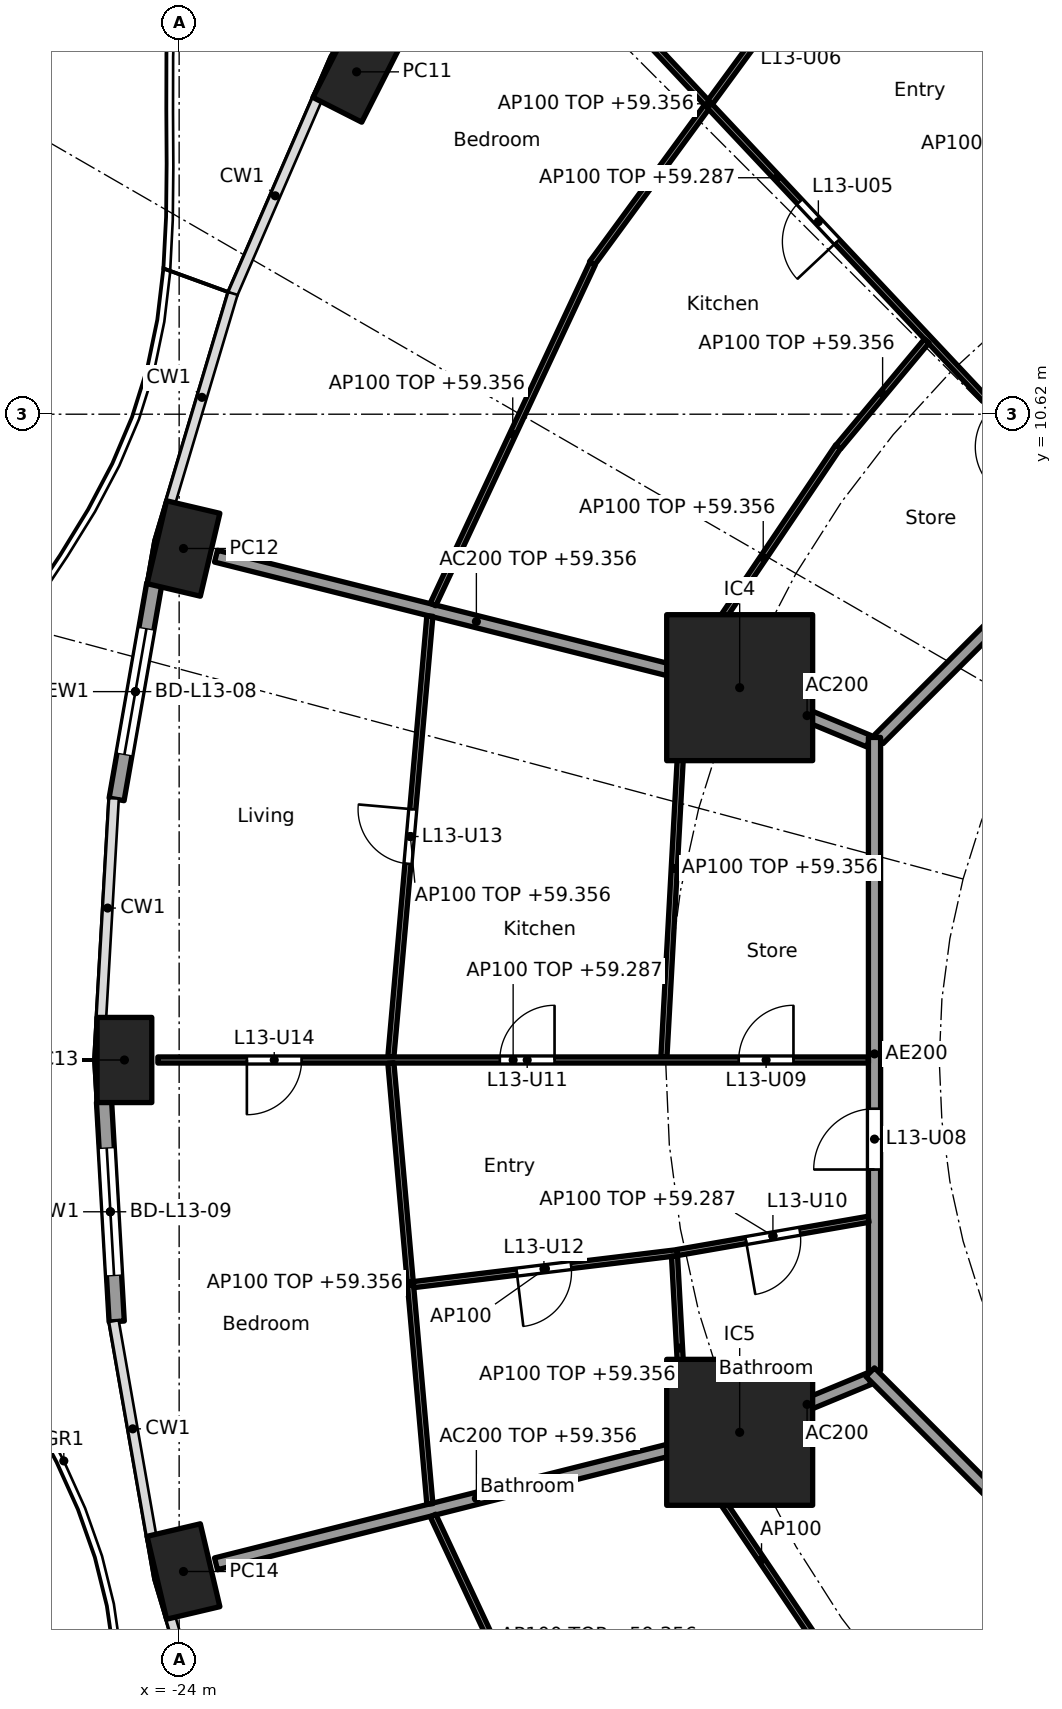
"""IFC4 building model, lengths in metres.
Left out: names, types, materials, properties, quantities, classifications, styles, units other than length and angle.
Written with IfcOpenShell. Run it as: python <this file> out.ifc"""

import sys

from ifc_helpers import new_model, si_unit, direction, frame, frame_2d, origin, origin_2d, place, context, subcontext, project, spatial, rectangle, hollow_rectangle, extrude, element, fill, save


model = new_model("IFC4")
c1 = context("Model", 3, precision=1e-05, world=origin(), true_north=direction((0.0, 1.0)))
c2 = subcontext(c1, "Body", "Model", "MODEL_VIEW")
j1 = project(units=[si_unit("LENGTHUNIT", "METRE"), si_unit("PLANEANGLEUNIT", "RADIAN")], contexts=[c1])
p1 = place(None, origin())
s1 = spatial("IfcSite", under=j1, at=p1, CompositionType="ELEMENT")
p2 = place(p1, origin())
s2 = spatial("IfcBuilding", under=s1, at=p2, CompositionType="ELEMENT")
p3 = place(p2, frame((0.0, 0.0, 56.6)))
s3 = spatial("IfcBuildingStorey", under=s2, at=p3, CompositionType="ELEMENT", Elevation=56.6)
for number, where, z_axis, x_axis in (
    (1, (-21.082, 16.25, 0.0), (0.0, 0.0, 1.0), (-0.452, -0.892, 0.0)),
    (2, (-23.929, 8.412, 0.0), (0.0, 0.0, 1.0), (-0.229, -0.973, 0.0)),
    (3, (-24.9, 0.0, 0.0), (0.0, 0.0, 1.0), (0.0, -1.0, 0.0)),
    (4, (-23.929, -8.412, 0.0), (0.0, 0.0, 1.0), (0.229, -0.973, 0.0)),
):
    element("IfcColumn", number, at=place(p3, frame(where, z_axis=z_axis, x_axis=x_axis)), inside=s3, PredefinedType="COLUMN", context=c2, shape_type="SweptSolid", body=[
        extrude(hollow_rectangle(XDim=1.4, YDim=0.9, WallThickness=0.05, at=origin_2d()), origin(), (0.0, 0.0, 1.0), 3.7),
    ])
for number, where, z_axis, x_axis in (
    (5, (-14.782, 6.123, 0.0), (0.0, 0.0, 1.0), (1.0, 0.0, 0.0)),
    (6, (-14.782, -6.123, 0.0), (0.0, 0.0, 1.0), (1.0, 0.0, 0.0)),
):
    element("IfcColumn", number, at=place(p3, frame(where, z_axis=z_axis, x_axis=x_axis)), inside=s3, PredefinedType="COLUMN", context=c2, shape_type="SweptSolid", body=[
        extrude(rectangle(XDim=2.4, YDim=2.4, at=origin_2d()), origin(), (0.0, 0.0, 1.0), 3.7),
    ])
p4 = place(p3, frame((-25.029, 4.286, 0.0), z_axis=(0.0, 0.0, 1.0), x_axis=(0.172217377323, 0.98505897029, 0.0)))
e7 = element("IfcWall", 7, at=p4, inside=s3, PredefinedType="SOLIDWALL", context=c2, shape_type="SweptSolid", body=[
    extrude(rectangle(XDim=3.598, YDim=0.25, at=frame_2d((1.799, 0.0))), origin(), (0.0, 0.0, 1.0), 3.44),
])
p5 = place(p4, frame((0.749, 0.0, 0.0)))
e8 = element("IfcOpeningElement", 8, at=p5, cuts=e7, PredefinedType="OPENING", context=c2, shape_type="SweptSolid", body=[
    extrude(rectangle(XDim=2.1, YDim=2.4, at=frame_2d((1.05, 1.2))), frame((0.0, 0.135, 0.0), z_axis=(0.0, -1.0, 0.0), x_axis=(1.0, 0.0, 0.0)), (0.0, 0.0, 1.0), 0.27),
])
p6 = place(p3, frame((-25.027, -4.3, 0.0), z_axis=(0.0, 0.0, 1.0), x_axis=(-0.057478727308, 0.998346731305, 0.0)))
e9 = element("IfcWall", 9, at=p6, inside=s3, PredefinedType="SOLIDWALL", context=c2, shape_type="SweptSolid", body=[
    extrude(rectangle(XDim=3.615, YDim=0.25, at=frame_2d((1.807, 0.0))), origin(), (0.0, 0.0, 1.0), 3.44),
])
p7 = place(p6, frame((0.757, 0.0, 0.0)))
e10 = element("IfcOpeningElement", 10, at=p7, cuts=e9, PredefinedType="OPENING", context=c2, shape_type="SweptSolid", body=[
    extrude(rectangle(XDim=2.1, YDim=2.4, at=frame_2d((1.05, 1.2))), frame((0.0, 0.135, 0.0), z_axis=(0.0, -1.0, 0.0), x_axis=(1.0, 0.0, 0.0)), (0.0, 0.0, 1.0), 0.27),
])
p8 = place(p3, frame((-12.657, 5.243, 0.0), z_axis=(0.0, 0.0, 1.0), x_axis=(-0.923885664896, 0.382668627144, 0.0)))
e11 = element("IfcWall", 11, at=p8, inside=s3, PredefinedType="PARTITIONING", context=c2, shape_type="SweptSolid", body=[
    extrude(rectangle(XDim=2.2, YDim=0.2, at=frame_2d((1.1, 0.0))), origin(), (0.0, 0.0, 1.0), 3.44),
])
p9 = place(p3, frame((-14.831, 6.135, 0.0), z_axis=(0.0, 0.0, 1.0), x_axis=(-0.969884949569, 0.243563512454, 0.0)))
e12 = element("IfcWall", 12, at=p9, inside=s3, PredefinedType="PARTITIONING", context=c2, shape_type="SweptSolid", body=[
    extrude(rectangle(XDim=8.829, YDim=0.2, at=frame_2d((4.415, 0.0))), origin(), (0.0, 0.0, 1.0), 2.756),
])
p10 = place(p3, frame((-12.657, -5.243, 0.0), z_axis=(0.0, 0.0, 1.0), x_axis=(-0.923885664896, -0.382668627144, 0.0)))
e13 = element("IfcWall", 13, at=p10, inside=s3, PredefinedType="PARTITIONING", context=c2, shape_type="SweptSolid", body=[
    extrude(rectangle(XDim=2.2, YDim=0.2, at=frame_2d((1.1, 0.0))), origin(), (0.0, 0.0, 1.0), 3.44),
])
p11 = place(p3, frame((-14.831, -6.135, 0.0), z_axis=(0.0, 0.0, 1.0), x_axis=(-0.969884949569, -0.243563512454, 0.0)))
e14 = element("IfcWall", 14, at=p11, inside=s3, PredefinedType="PARTITIONING", context=c2, shape_type="SweptSolid", body=[
    extrude(rectangle(XDim=8.829, YDim=0.2, at=frame_2d((4.415, 0.0))), origin(), (0.0, 0.0, 1.0), 2.756),
])
p12 = place(p3, frame((-5.275, 12.494, 0.0), z_axis=(0.0, 0.0, 1.0), x_axis=(-0.707106781187, -0.707106781187, 0.0)))
e15 = element("IfcWall", 15, at=p12, inside=s3, PredefinedType="PARTITIONING", context=c2, shape_type="SweptSolid", body=[
    extrude(rectangle(XDim=10.209, YDim=0.2, at=frame_2d((5.104, 0.0))), origin(), (0.0, 0.0, 1.0), 3.44),
])
p13 = place(p12, frame((2.87, 0.0, 0.0)))
e16 = element("IfcOpeningElement", 16, at=p13, cuts=e15, PredefinedType="OPENING", context=c2, shape_type="SweptSolid", body=[
    extrude(rectangle(XDim=1.0, YDim=2.1, at=frame_2d((0.5, 1.05))), frame((0.0, 0.11, 0.0), z_axis=(0.0, -1.0, 0.0), x_axis=(1.0, 0.0, 0.0)), (0.0, 0.0, 1.0), 0.22),
])
p14 = place(p3, frame((-12.565, 5.304, 0.0), z_axis=(0.0, 0.0, 1.0), x_axis=(0.0, -1.0, 0.0)))
e17 = element("IfcWall", 17, at=p14, inside=s3, PredefinedType="PARTITIONING", context=c2, shape_type="SweptSolid", body=[
    extrude(rectangle(XDim=10.409, YDim=0.2, at=frame_2d((5.205, 0.0))), origin(), (0.0, 0.0, 1.0), 3.44),
])
p15 = place(p14, frame((6.106, 0.0, 0.0)))
e18 = element("IfcOpeningElement", 18, at=p15, cuts=e17, PredefinedType="OPENING", context=c2, shape_type="SweptSolid", body=[
    extrude(rectangle(XDim=1.0, YDim=2.1, at=frame_2d((0.5, 1.05))), frame((0.0, 0.11, 0.0), z_axis=(0.0, -1.0, 0.0), x_axis=(1.0, 0.0, 0.0)), (0.0, 0.0, 1.0), 0.22),
])
p16 = place(p3, frame((-12.635, -5.134, 0.0), z_axis=(0.0, 0.0, 1.0), x_axis=(0.707106781187, -0.707106781187, 0.0)))
e19 = element("IfcWall", 19, at=p16, inside=s3, PredefinedType="PARTITIONING", context=c2, shape_type="SweptSolid", body=[
    extrude(rectangle(XDim=10.609, YDim=0.2, at=frame_2d((5.305, 0.0))), origin(), (0.0, 0.0, 1.0), 3.44),
])
p17 = place(p3, frame((-6.477, 11.427, 0.0), z_axis=(0.0, 0.0, 1.0), x_axis=(-0.457464037982, 0.889228122561, 0.0)))
e20 = element("IfcWall", 20, at=p17, inside=s3, PredefinedType="PARTITIONING", context=c2, shape_type="SweptSolid", body=[
    extrude(rectangle(XDim=10.032, YDim=0.1, at=frame_2d((5.016, 0.0))), origin(), (0.0, 0.0, 1.0), 2.687),
])
p18 = place(p17, frame((0.35, 0.0, 0.0)))
e21 = element("IfcOpeningElement", 21, at=p18, cuts=e20, PredefinedType="OPENING", context=c2, shape_type="SweptSolid", body=[
    extrude(rectangle(XDim=0.9, YDim=2.1, at=frame_2d((0.45, 1.05))), frame((0.0, 0.06, 0.0), z_axis=(0.0, -1.0, 0.0), x_axis=(1.0, 0.0, 0.0)), (0.0, 0.0, 1.0), 0.12),
])
p19 = place(p17, frame((6.735, 0.0, 0.0)))
e22 = element("IfcOpeningElement", 22, at=p19, cuts=e20, PredefinedType="OPENING", context=c2, shape_type="SweptSolid", body=[
    extrude(rectangle(XDim=0.9, YDim=2.1, at=frame_2d((0.45, 1.05))), frame((0.0, 0.06, 0.0), z_axis=(0.0, -1.0, 0.0), x_axis=(1.0, 0.0, 0.0)), (0.0, 0.0, 1.0), 0.12),
])
p20 = place(p3, frame((-13.362, 18.35, 0.0), z_axis=(0.0, 0.0, 1.0), x_axis=(-0.591191311491, -0.806531359104, 0.0)))
e23 = element("IfcWall", 23, at=p20, inside=s3, PredefinedType="PARTITIONING", context=c2, shape_type="SweptSolid", body=[
    extrude(rectangle(XDim=6.51, YDim=0.1, at=frame_2d((3.255, 0.0))), origin(), (0.0, 0.0, 1.0), 2.756),
])
p21 = place(p20, frame((1.202, 0.0, 0.0)))
e24 = element("IfcOpeningElement", 24, at=p21, cuts=e23, PredefinedType="OPENING", context=c2, shape_type="SweptSolid", body=[
    extrude(rectangle(XDim=0.9, YDim=2.1, at=frame_2d((0.45, 1.05))), frame((0.0, 0.06, 0.0), z_axis=(0.0, -1.0, 0.0), x_axis=(1.0, 0.0, 0.0)), (0.0, 0.0, 1.0), 0.12),
])
p22 = place(p3, frame((-8.953, 8.958, 0.0), z_axis=(0.0, 0.0, 1.0), x_axis=(-0.684574307023, 0.728943082939, 0.0)))
e25 = element("IfcWall", 25, at=p22, inside=s3, PredefinedType="PARTITIONING", context=c2, shape_type="SweptSolid", body=[
    extrude(rectangle(XDim=15.231, YDim=0.1, at=frame_2d((7.615, 0.0))), origin(), (0.0, 0.0, 1.0), 2.687),
])
p23 = place(p22, frame((1.54, 0.0, 0.0)))
e26 = element("IfcOpeningElement", 26, at=p23, cuts=e25, PredefinedType="OPENING", context=c2, shape_type="SweptSolid", body=[
    extrude(rectangle(XDim=0.9, YDim=2.1, at=frame_2d((0.45, 1.05))), frame((0.0, 0.06, 0.0), z_axis=(0.0, -1.0, 0.0), x_axis=(1.0, 0.0, 0.0)), (0.0, 0.0, 1.0), 0.12),
])
p24 = place(p22, frame((6.174, 0.0, 0.0)))
e27 = element("IfcOpeningElement", 27, at=p24, cuts=e25, PredefinedType="OPENING", context=c2, shape_type="SweptSolid", body=[
    extrude(rectangle(XDim=0.9, YDim=2.1, at=frame_2d((0.45, 1.05))), frame((0.0, 0.06, 0.0), z_axis=(0.0, -1.0, 0.0), x_axis=(1.0, 0.0, 0.0)), (0.0, 0.0, 1.0), 0.12),
])
p25 = place(p22, frame((11.8, 0.0, 0.0)))
e28 = element("IfcOpeningElement", 28, at=p25, cuts=e25, PredefinedType="OPENING", context=c2, shape_type="SweptSolid", body=[
    extrude(rectangle(XDim=0.9, YDim=2.1, at=frame_2d((0.45, 1.05))), frame((0.0, 0.06, 0.0), z_axis=(0.0, -1.0, 0.0), x_axis=(1.0, 0.0, 0.0)), (0.0, 0.0, 1.0), 0.12),
])
p26 = place(p3, frame((-11.705, 11.825, 0.0), z_axis=(0.0, 0.0, 1.0), x_axis=(-0.640861724905, -0.767656335577, 0.0)))
e29 = element("IfcWall", 29, at=p26, inside=s3, PredefinedType="PARTITIONING", context=c2, shape_type="SweptSolid", body=[
    extrude(rectangle(XDim=2.268, YDim=0.1, at=frame_2d((1.134, 0.0))), origin(), (0.0, 0.0, 1.0), 2.756),
])
p27 = place(p3, frame((-13.162, 10.087, 0.0), z_axis=(0.0, 0.0, 1.0), x_axis=(-0.55912750241, -0.829081682375, 0.0)))
e30 = element("IfcWall", 30, at=p27, inside=s3, PredefinedType="PARTITIONING", context=c2, shape_type="SweptSolid", body=[
    extrude(rectangle(XDim=4.408, YDim=0.1, at=frame_2d((2.204, 0.0))), origin(), (0.0, 0.0, 1.0), 2.756),
])
p28 = place(p3, frame((-17.203, 13.095, 0.0), z_axis=(0.0, 0.0, 1.0), x_axis=(-0.423926333401, -0.905696673202, 0.0)))
e31 = element("IfcWall", 31, at=p28, inside=s3, PredefinedType="PARTITIONING", context=c2, shape_type="SweptSolid", body=[
    extrude(rectangle(XDim=6.188, YDim=0.1, at=frame_2d((3.094, 0.0))), origin(), (0.0, 0.0, 1.0), 2.756),
])
p29 = place(p3, frame((-15.688, 6.249, 0.0), z_axis=(0.0, 0.0, 1.0), x_axis=(-0.054659814056, -0.998505034903, 0.0)))
e32 = element("IfcWall", 32, at=p29, inside=s3, PredefinedType="PARTITIONING", context=c2, shape_type="SweptSolid", body=[
    extrude(rectangle(XDim=6.208, YDim=0.1, at=frame_2d((3.104, 0.0))), origin(), (0.0, 0.0, 1.0), 2.756),
])
p30 = place(p3, frame((-19.877, 7.301, 0.0), z_axis=(0.0, 0.0, 1.0), x_axis=(-0.088143415068, -0.996107794558, 0.0)))
e33 = element("IfcWall", 33, at=p30, inside=s3, PredefinedType="PARTITIONING", context=c2, shape_type="SweptSolid", body=[
    extrude(rectangle(XDim=7.279, YDim=0.1, at=frame_2d((3.64, 0.0))), origin(), (0.0, 0.0, 1.0), 2.756),
])
p31 = place(p30, frame((3.189, 0.0, 0.0)))
e34 = element("IfcOpeningElement", 34, at=p31, cuts=e33, PredefinedType="OPENING", context=c2, shape_type="SweptSolid", body=[
    extrude(rectangle(XDim=0.9, YDim=2.1, at=frame_2d((0.45, 1.05))), frame((0.0, 0.06, 0.0), z_axis=(0.0, -1.0, 0.0), x_axis=(1.0, 0.0, 0.0)), (0.0, 0.0, 1.0), 0.12),
])
p32 = place(p3, frame((-12.665, 0.0, 0.0), z_axis=(0.0, 0.0, 1.0), x_axis=(-1.0, 0.0, 0.0)))
e35 = element("IfcWall", 35, at=p32, inside=s3, PredefinedType="PARTITIONING", context=c2, shape_type="SweptSolid", body=[
    extrude(rectangle(XDim=11.685, YDim=0.1, at=frame_2d((5.843, 0.0))), origin(), (0.0, 0.0, 1.0), 2.687),
])
p33 = place(p32, frame((1.233, 0.0, 0.0)))
e36 = element("IfcOpeningElement", 36, at=p33, cuts=e35, PredefinedType="OPENING", context=c2, shape_type="SweptSolid", body=[
    extrude(rectangle(XDim=0.9, YDim=2.1, at=frame_2d((0.45, 1.05))), frame((0.0, 0.06, 0.0), z_axis=(0.0, -1.0, 0.0), x_axis=(1.0, 0.0, 0.0)), (0.0, 0.0, 1.0), 0.12),
])
p34 = place(p32, frame((5.162, 0.0, 0.0)))
e37 = element("IfcOpeningElement", 37, at=p34, cuts=e35, PredefinedType="OPENING", context=c2, shape_type="SweptSolid", body=[
    extrude(rectangle(XDim=0.9, YDim=2.1, at=frame_2d((0.45, 1.05))), frame((0.0, 0.06, 0.0), z_axis=(0.0, -1.0, 0.0), x_axis=(1.0, 0.0, 0.0)), (0.0, 0.0, 1.0), 0.12),
])
p35 = place(p32, frame((9.322, 0.0, 0.0)))
e38 = element("IfcOpeningElement", 38, at=p35, cuts=e35, PredefinedType="OPENING", context=c2, shape_type="SweptSolid", body=[
    extrude(rectangle(XDim=0.9, YDim=2.1, at=frame_2d((0.45, 1.05))), frame((0.0, 0.06, 0.0), z_axis=(0.0, -1.0, 0.0), x_axis=(1.0, 0.0, 0.0)), (0.0, 0.0, 1.0), 0.12),
])
p36 = place(p3, frame((-20.518, -0.05, 0.0), z_axis=(0.0, 0.0, 1.0), x_axis=(0.088143415068, -0.996107794558, 0.0)))
e39 = element("IfcWall", 39, at=p36, inside=s3, PredefinedType="PARTITIONING", context=c2, shape_type="SweptSolid", body=[
    extrude(rectangle(XDim=7.279, YDim=0.1, at=frame_2d((3.64, 0.0))), origin(), (0.0, 0.0, 1.0), 2.756),
])
p37 = place(p3, frame((-12.663, -2.619, 0.0), z_axis=(0.0, 0.0, 1.0), x_axis=(-0.985220176102, -0.171292745325, 0.0)))
e40 = element("IfcWall", 40, at=p37, inside=s3, PredefinedType="PARTITIONING", context=c2, shape_type="SweptSolid", body=[
    extrude(rectangle(XDim=3.191, YDim=0.1, at=frame_2d((1.596, 0.0))), origin(), (0.0, 0.0, 1.0), 2.687),
])
p38 = place(p37, frame((1.146, 0.0, 0.0)))
e41 = element("IfcOpeningElement", 41, at=p38, cuts=e40, PredefinedType="OPENING", context=c2, shape_type="SweptSolid", body=[
    extrude(rectangle(XDim=0.9, YDim=2.1, at=frame_2d((0.45, 1.05))), frame((0.0, 0.06, 0.0), z_axis=(0.0, -1.0, 0.0), x_axis=(1.0, 0.0, 0.0)), (0.0, 0.0, 1.0), 0.12),
])
p39 = place(p3, frame((-15.807, -3.168, 0.0), z_axis=(0.0, 0.0, 1.0), x_axis=(-0.992741666002, -0.120266306938, 0.0)))
e42 = element("IfcWall", 42, at=p39, inside=s3, PredefinedType="PARTITIONING", context=c2, shape_type="SweptSolid", body=[
    extrude(rectangle(XDim=4.371, YDim=0.1, at=frame_2d((2.185, 0.0))), origin(), (0.0, 0.0, 1.0), 3.44),
])
p40 = place(p39, frame((1.76, 0.0, 0.0)))
e43 = element("IfcOpeningElement", 43, at=p40, cuts=e42, PredefinedType="OPENING", context=c2, shape_type="SweptSolid", body=[
    extrude(rectangle(XDim=0.9, YDim=2.1, at=frame_2d((0.45, 1.05))), frame((0.0, 0.06, 0.0), z_axis=(0.0, -1.0, 0.0), x_axis=(1.0, 0.0, 0.0)), (0.0, 0.0, 1.0), 0.12),
])
p41 = place(p3, frame((-15.854, -3.225, 0.0), z_axis=(0.0, 0.0, 1.0), x_axis=(0.054644199943, -0.998505889523, 0.0)))
e44 = element("IfcWall", 44, at=p41, inside=s3, PredefinedType="PARTITIONING", context=c2, shape_type="SweptSolid", body=[
    extrude(rectangle(XDim=3.029, YDim=0.1, at=frame_2d((1.515, 0.0))), origin(), (0.0, 0.0, 1.0), 2.756),
])
p42 = place(p3, frame((-15.627, -6.432, 0.0), z_axis=(0.0, 0.0, 1.0), x_axis=(0.559112679527, -0.829091678641, 0.0)))
e45 = element("IfcWall", 45, at=p42, inside=s3, PredefinedType="PARTITIONING", context=c2, shape_type="SweptSolid", body=[
    extrude(rectangle(XDim=4.308, YDim=0.1, at=frame_2d((2.154, 0.0))), origin(), (0.0, 0.0, 1.0), 3.44),
])
p43 = place(p3, frame((-19.826, -7.491, 0.0), z_axis=(0.0, 0.0, 1.0), x_axis=(0.423926333401, -0.905696673202, 0.0)))
e46 = element("IfcWall", 46, at=p43, inside=s3, PredefinedType="PARTITIONING", context=c2, shape_type="SweptSolid", body=[
    extrude(rectangle(XDim=6.188, YDim=0.1, at=frame_2d((3.094, 0.0))), origin(), (0.0, 0.0, 1.0), 2.756),
])
p44 = place(p5, origin())
e47 = element("IfcDoor", 47, at=p44, inside=s3, OperationType="SLIDING_TO_LEFT", PredefinedType="DOOR", context=c2, shape_type="SweptSolid", body=[
    extrude(rectangle(XDim=2.1, YDim=2.4, at=frame_2d((1.05, 1.2))), frame((0.0, 0.025, 0.0), z_axis=(0.0, -1.0, 0.0), x_axis=(1.0, 0.0, 0.0)), (0.0, 0.0, 1.0), 0.05),
])
fill(e8, e47)
p45 = place(p7, origin())
e48 = element("IfcDoor", 48, at=p45, inside=s3, OperationType="SLIDING_TO_LEFT", PredefinedType="DOOR", context=c2, shape_type="SweptSolid", body=[
    extrude(rectangle(XDim=2.1, YDim=2.4, at=frame_2d((1.05, 1.2))), frame((0.0, 0.025, 0.0), z_axis=(0.0, -1.0, 0.0), x_axis=(1.0, 0.0, 0.0)), (0.0, 0.0, 1.0), 0.05),
])
fill(e10, e48)
p46 = place(p24, origin())
e49 = element("IfcDoor", 49, at=p46, inside=s3, OperationType="SINGLE_SWING_LEFT", PredefinedType="DOOR", context=c2, shape_type="SweptSolid", body=[
    extrude(rectangle(XDim=0.9, YDim=2.1, at=frame_2d((0.45, 1.05))), frame((0.0, 0.025, 0.0), z_axis=(0.0, -1.0, 0.0), x_axis=(1.0, 0.0, 0.0)), (0.0, 0.0, 1.0), 0.05),
])
fill(e27, e49)
p47 = place(p15, frame((1.0, 0.0, 0.0), x_axis=(-1.0, 0.0, 0.0)))
e50 = element("IfcDoor", 50, at=p47, inside=s3, OperationType="SINGLE_SWING_LEFT", PredefinedType="DOOR", context=c2, shape_type="SweptSolid", body=[
    extrude(rectangle(XDim=1.0, YDim=2.1, at=frame_2d((0.5, 1.05))), frame((0.0, 0.025, 0.0), z_axis=(0.0, -1.0, 0.0), x_axis=(1.0, 0.0, 0.0)), (0.0, 0.0, 1.0), 0.05),
])
fill(e18, e50)
p48 = place(p33, frame((0.9, 0.0, 0.0), x_axis=(-1.0, 0.0, 0.0)))
e51 = element("IfcDoor", 51, at=p48, inside=s3, OperationType="SINGLE_SWING_RIGHT", PredefinedType="DOOR", context=c2, shape_type="SweptSolid", body=[
    extrude(rectangle(XDim=0.9, YDim=2.1, at=frame_2d((0.45, 1.05))), frame((0.0, 0.025, 0.0), z_axis=(0.0, -1.0, 0.0), x_axis=(1.0, 0.0, 0.0)), (0.0, 0.0, 1.0), 0.05),
])
fill(e36, e51)
p49 = place(p38, origin())
e52 = element("IfcDoor", 52, at=p49, inside=s3, OperationType="SINGLE_SWING_RIGHT", PredefinedType="DOOR", context=c2, shape_type="SweptSolid", body=[
    extrude(rectangle(XDim=0.9, YDim=2.1, at=frame_2d((0.45, 1.05))), frame((0.0, 0.025, 0.0), z_axis=(0.0, -1.0, 0.0), x_axis=(1.0, 0.0, 0.0)), (0.0, 0.0, 1.0), 0.05),
])
fill(e41, e52)
p50 = place(p34, frame((0.9, 0.0, 0.0), x_axis=(-1.0, 0.0, 0.0)))
e53 = element("IfcDoor", 53, at=p50, inside=s3, OperationType="SINGLE_SWING_RIGHT", PredefinedType="DOOR", context=c2, shape_type="SweptSolid", body=[
    extrude(rectangle(XDim=0.9, YDim=2.1, at=frame_2d((0.45, 1.05))), frame((0.0, 0.025, 0.0), z_axis=(0.0, -1.0, 0.0), x_axis=(1.0, 0.0, 0.0)), (0.0, 0.0, 1.0), 0.05),
])
fill(e37, e53)
p51 = place(p40, origin())
e54 = element("IfcDoor", 54, at=p51, inside=s3, OperationType="SINGLE_SWING_RIGHT", PredefinedType="DOOR", context=c2, shape_type="SweptSolid", body=[
    extrude(rectangle(XDim=0.9, YDim=2.1, at=frame_2d((0.45, 1.05))), frame((0.0, 0.025, 0.0), z_axis=(0.0, -1.0, 0.0), x_axis=(1.0, 0.0, 0.0)), (0.0, 0.0, 1.0), 0.05),
])
fill(e43, e54)
p52 = place(p31, frame((0.9, 0.0, 0.0), x_axis=(-1.0, 0.0, 0.0)))
e55 = element("IfcDoor", 55, at=p52, inside=s3, OperationType="SINGLE_SWING_RIGHT", PredefinedType="DOOR", context=c2, shape_type="SweptSolid", body=[
    extrude(rectangle(XDim=0.9, YDim=2.1, at=frame_2d((0.45, 1.05))), frame((0.0, 0.025, 0.0), z_axis=(0.0, -1.0, 0.0), x_axis=(1.0, 0.0, 0.0)), (0.0, 0.0, 1.0), 0.05),
])
fill(e34, e55)
p53 = place(p35, origin())
e56 = element("IfcDoor", 56, at=p53, inside=s3, OperationType="SINGLE_SWING_RIGHT", PredefinedType="DOOR", context=c2, shape_type="SweptSolid", body=[
    extrude(rectangle(XDim=0.9, YDim=2.1, at=frame_2d((0.45, 1.05))), frame((0.0, 0.025, 0.0), z_axis=(0.0, -1.0, 0.0), x_axis=(1.0, 0.0, 0.0)), (0.0, 0.0, 1.0), 0.05),
])
fill(e38, e56)
save(model, sys.argv[1])
